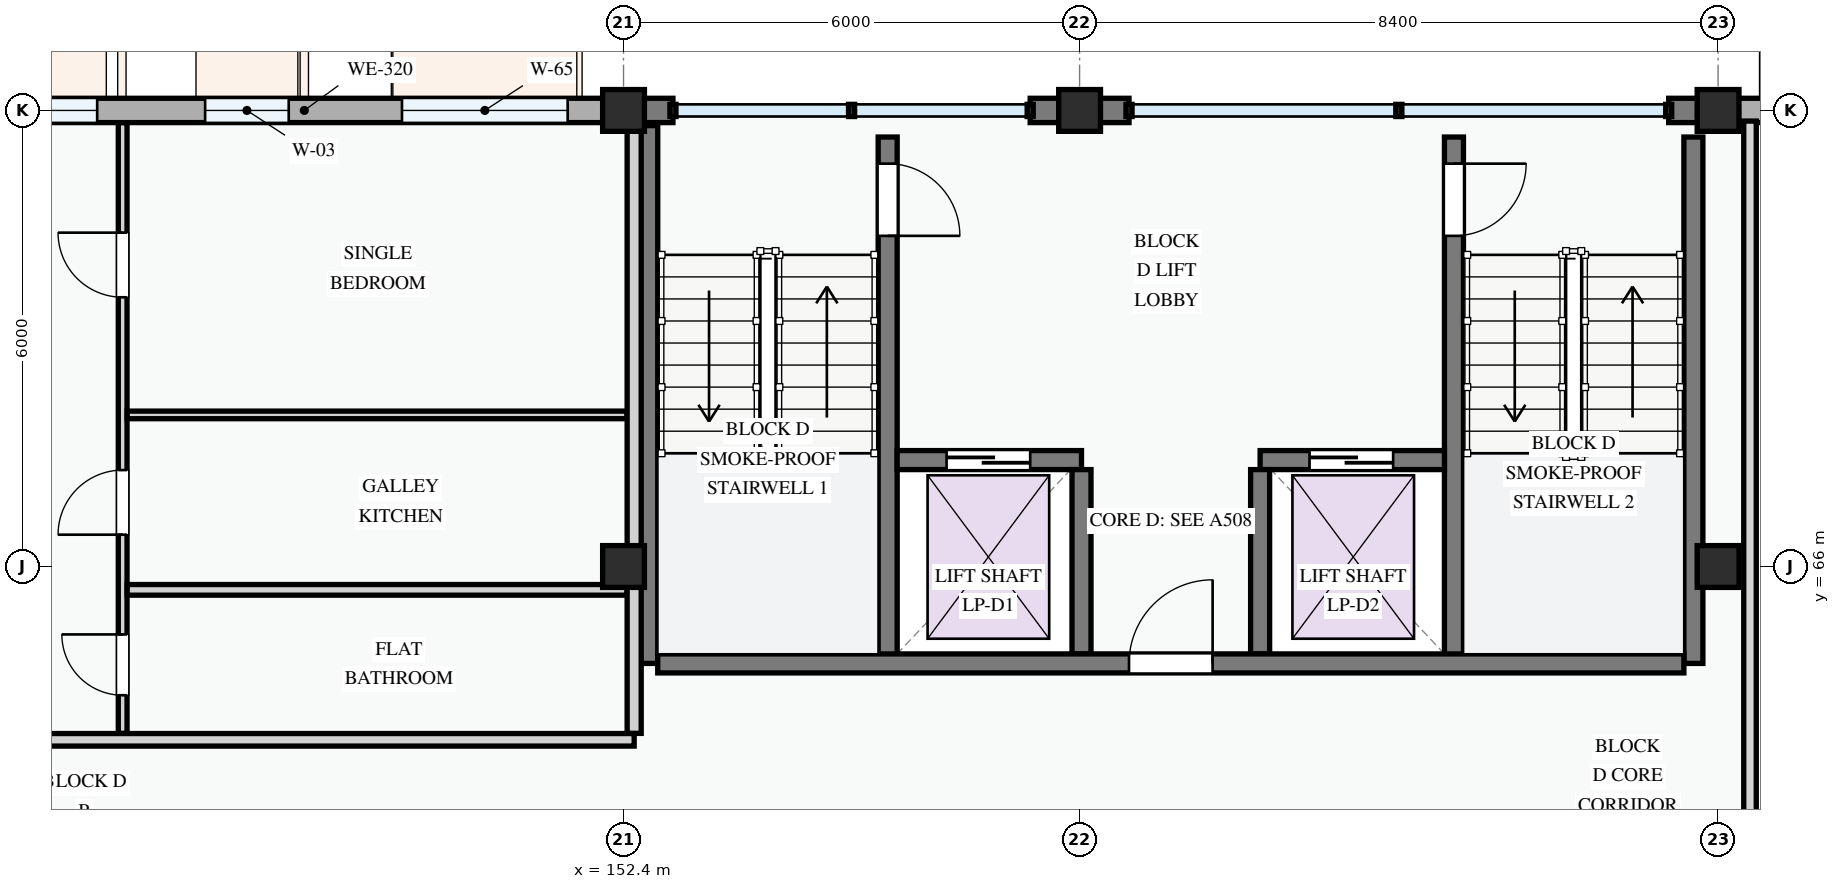
"""IFC4 building model, lengths in metres.
Left out: names, types, materials, properties, quantities, classifications, styles, units other than length and angle.
Written with IfcOpenShell. Run it as: python <this file> out.ifc"""

import sys

from ifc_helpers import new_model, si_unit, direction, frame, frame_2d, origin, origin_2d, place, context, subcontext, project, spatial, rectangle, extrude, element, fill, save


model = new_model("IFC4")
c1 = context("Model", 3, precision=1e-05, world=origin(), true_north=direction((0.0, 1.0)))
c2 = subcontext(c1, "Body", "Model", "MODEL_VIEW")
j1 = project(units=[si_unit("LENGTHUNIT", "METRE"), si_unit("PLANEANGLEUNIT", "RADIAN")], contexts=[c1])
p1 = place(None, origin())
s1 = spatial("IfcSite", under=j1, at=p1, CompositionType="ELEMENT")
p2 = place(p1, origin())
s2 = spatial("IfcBuilding", under=s1, at=p2, CompositionType="ELEMENT")
p3 = place(p2, frame((0.0, 0.0, 11.4)))
s3 = spatial("IfcBuildingStorey", under=s2, at=p3, CompositionType="ELEMENT", Elevation=11.4)
for number, where, z_axis, x_axis in (
    (1, (152.4, 66.0, 0.0), (0.0, 0.0, 1.0), (1.0, 0.0, 0.0)),
    (2, (152.4, 72.0, 0.0), (0.0, 0.0, 1.0), (1.0, 0.0, 0.0)),
    (3, (158.4, 72.0, 0.0), (0.0, 0.0, 1.0), (1.0, 0.0, 0.0)),
    (4, (166.8, 66.0, 0.0), (0.0, 0.0, 1.0), (1.0, 0.0, 0.0)),
    (5, (166.8, 72.0, 0.0), (0.0, 0.0, 1.0), (1.0, 0.0, 0.0)),
):
    element("IfcColumn", number, at=place(p3, frame(where, z_axis=z_axis, x_axis=x_axis)), inside=s3, PredefinedType="COLUMN", context=c2, shape_type="SweptSolid", body=[
        extrude(rectangle(XDim=0.55, YDim=0.55, at=origin_2d()), origin(), (0.0, 0.0, 1.0), 3.3),
    ])
p4 = place(p3, frame((152.4, 72.0, 0.0), z_axis=(0.0, 0.0, 1.0), x_axis=(-1.0, 0.0, 0.0)))
e6 = element("IfcWall", 6, at=p4, inside=s3, PredefinedType="STANDARD", context=c2, shape_type="SweptSolid", body=[
    extrude(rectangle(XDim=8.4, YDim=0.32, at=frame_2d((4.2, 0.0))), origin(), (0.0, 0.0, 1.0), 2.375),
])
p5 = place(p4, frame((0.735, 0.0, 0.78)))
e7 = element("IfcOpeningElement", 7, at=p5, cuts=e6, PredefinedType="OPENING", context=c2, shape_type="SweptSolid", body=[
    extrude(rectangle(XDim=2.18, YDim=1.48, at=frame_2d((1.09, 0.74))), frame((0.0, 0.17, 0.0), z_axis=(0.0, -1.0, 0.0), x_axis=(1.0, 0.0, 0.0)), (0.0, 0.0, 1.0), 0.34),
])
p6 = place(p4, frame((4.405, 0.0, 0.78)))
e8 = element("IfcOpeningElement", 8, at=p6, cuts=e6, PredefinedType="OPENING", context=c2, shape_type="SweptSolid", body=[
    extrude(rectangle(XDim=1.1, YDim=1.3, at=frame_2d((0.55, 0.65))), frame((0.0, 0.17, 0.0), z_axis=(0.0, -1.0, 0.0), x_axis=(1.0, 0.0, 0.0)), (0.0, 0.0, 1.0), 0.34),
])
p7 = place(p4, frame((6.925, 0.0, 0.78)))
e9 = element("IfcOpeningElement", 9, at=p7, cuts=e6, PredefinedType="OPENING", context=c2, shape_type="SweptSolid", body=[
    extrude(rectangle(XDim=0.95, YDim=1.15, at=frame_2d((0.475, 0.575))), frame((0.0, 0.17, 0.0), z_axis=(0.0, -1.0, 0.0), x_axis=(1.0, 0.0, 0.0)), (0.0, 0.0, 1.0), 0.34),
])
p8 = place(p3, frame((174.0, 72.0, 0.0), z_axis=(0.0, 0.0, 1.0), x_axis=(-1.0, 0.0, 0.0)))
e10 = element("IfcWall", 10, at=p8, inside=s3, PredefinedType="STANDARD", context=c2, shape_type="SweptSolid", body=[
    extrude(rectangle(XDim=7.2, YDim=0.32, at=frame_2d((3.6, 0.0))), origin(), (0.0, 0.0, 1.0), 2.375),
])
p9 = place(p8, frame((1.248, 0.0, 0.78)))
e11 = element("IfcOpeningElement", 11, at=p9, cuts=e10, PredefinedType="OPENING", context=c2, shape_type="SweptSolid", body=[
    extrude(rectangle(XDim=1.25, YDim=1.45, at=frame_2d((0.625, 0.725))), frame((0.0, 0.17, 0.0), z_axis=(0.0, -1.0, 0.0), x_axis=(1.0, 0.0, 0.0)), (0.0, 0.0, 1.0), 0.34),
])
p10 = place(p8, frame((4.258, 0.0, 0.78)))
e12 = element("IfcOpeningElement", 12, at=p10, cuts=e10, PredefinedType="OPENING", context=c2, shape_type="SweptSolid", body=[
    extrude(rectangle(XDim=1.68, YDim=1.46, at=frame_2d((0.84, 0.73))), frame((0.0, 0.17, 0.0), z_axis=(0.0, -1.0, 0.0), x_axis=(1.0, 0.0, 0.0)), (0.0, 0.0, 1.0), 0.34),
])
for number, where, z_axis, x_axis in (
    (13, (166.8, 72.0, 0.0), (0.0, 0.0, 1.0), (-1.0, 0.0, 0.0)),
    (14, (159.05, 72.0, 0.0), (0.0, 0.0, 1.0), (-1.0, 0.0, 0.0)),
):
    element("IfcWall", number, at=place(p3, frame(where, z_axis=z_axis, x_axis=x_axis)), inside=s3, PredefinedType="STANDARD", context=c2, shape_type="SweptSolid", body=[
        extrude(rectangle(XDim=0.65, YDim=0.32, at=frame_2d((0.325, 0.0))), origin(), (0.0, 0.0, 1.0), 3.04),
    ])
p11 = place(p3, frame((158.4, 72.0, 0.0), z_axis=(0.0, 0.0, 1.0), x_axis=(-1.0, 0.0, 0.0)))
e15 = element("IfcWall", 15, at=p11, inside=s3, PredefinedType="STANDARD", context=c2, shape_type="SweptSolid", body=[
    extrude(rectangle(XDim=0.65, YDim=0.32, at=frame_2d((0.325, 0.0))), origin(), (0.0, 0.0, 1.0), 3.04),
])
p12 = place(p3, frame((153.05, 72.0, 0.0), z_axis=(0.0, 0.0, 1.0), x_axis=(-1.0, 0.0, 0.0)))
e16 = element("IfcWall", 16, at=p12, inside=s3, PredefinedType="STANDARD", context=c2, shape_type="SweptSolid", body=[
    extrude(rectangle(XDim=0.65, YDim=0.32, at=frame_2d((0.325, 0.0))), origin(), (0.0, 0.0, 1.0), 3.04),
])
p13 = place(p3, frame((155.875, 71.65, 0.0), z_axis=(0.0, 0.0, 1.0), x_axis=(0.0, -1.0, 0.0)))
e17 = element("IfcWall", 17, at=p13, inside=s3, PredefinedType="SHEAR", context=c2, shape_type="SweptSolid", body=[
    extrude(rectangle(XDim=6.925, YDim=0.25, at=frame_2d((3.462, 0.0))), origin(), (0.0, 0.0, 1.0), 3.0),
])
p14 = place(p13, frame((0.35, 0.0, 0.0)))
e18 = element("IfcOpeningElement", 18, at=p14, cuts=e17, PredefinedType="OPENING", context=c2, shape_type="SweptSolid", body=[
    extrude(rectangle(XDim=0.95, YDim=2.1, at=frame_2d((0.475, 1.05))), frame((0.0, 0.135, 0.0), z_axis=(0.0, -1.0, 0.0), x_axis=(1.0, 0.0, 0.0)), (0.0, 0.0, 1.0), 0.27),
])
p15 = place(p3, frame((152.725, 71.8, 0.0), z_axis=(0.0, 0.0, 1.0), x_axis=(0.0, -1.0, 0.0)))
e19 = element("IfcWall", 19, at=p15, inside=s3, PredefinedType="SHEAR", context=c2, shape_type="SweptSolid", body=[
    extrude(rectangle(XDim=7.075, YDim=0.25, at=frame_2d((3.538, 0.0))), origin(), (0.0, 0.0, 1.0), 3.0),
])
p16 = place(p3, frame((166.475, 71.65, 0.0), z_axis=(0.0, 0.0, 1.0), x_axis=(0.0, -1.0, 0.0)))
e20 = element("IfcWall", 20, at=p16, inside=s3, PredefinedType="SHEAR", context=c2, shape_type="SweptSolid", body=[
    extrude(rectangle(XDim=6.925, YDim=0.25, at=frame_2d((3.462, 0.0))), origin(), (0.0, 0.0, 1.0), 3.0),
])
p17 = place(p3, frame((163.325, 71.65, 0.0), z_axis=(0.0, 0.0, 1.0), x_axis=(0.0, -1.0, 0.0)))
e21 = element("IfcWall", 21, at=p17, inside=s3, PredefinedType="SHEAR", context=c2, shape_type="SweptSolid", body=[
    extrude(rectangle(XDim=6.925, YDim=0.25, at=frame_2d((3.462, 0.0))), origin(), (0.0, 0.0, 1.0), 3.0),
])
p18 = place(p17, frame((0.35, 0.0, 0.0)))
e22 = element("IfcOpeningElement", 22, at=p18, cuts=e21, PredefinedType="OPENING", context=c2, shape_type="SweptSolid", body=[
    extrude(rectangle(XDim=0.95, YDim=2.1, at=frame_2d((0.475, 1.05))), frame((0.0, 0.135, 0.0), z_axis=(0.0, -1.0, 0.0), x_axis=(1.0, 0.0, 0.0)), (0.0, 0.0, 1.0), 0.27),
])
p19 = place(p3, frame((156.0, 67.4, 0.0), z_axis=(0.0, 0.0, 1.0), x_axis=(1.0, 0.0, 0.0)))
e23 = element("IfcWall", 23, at=p19, inside=s3, PredefinedType="SHEAR", context=c2, shape_type="SweptSolid", body=[
    extrude(rectangle(XDim=2.425, YDim=0.25, at=frame_2d((1.212, 0.0))), origin(), (0.0, 0.0, 1.0), 3.0),
])
p20 = place(p19, frame((0.65, 0.0, 0.0)))
e24 = element("IfcOpeningElement", 24, at=p20, cuts=e23, PredefinedType="OPENING", context=c2, shape_type="SweptSolid", body=[
    extrude(rectangle(XDim=1.1, YDim=2.15, at=frame_2d((0.55, 1.075))), frame((0.0, 0.135, 0.0), z_axis=(0.0, -1.0, 0.0), x_axis=(1.0, 0.0, 0.0)), (0.0, 0.0, 1.0), 0.27),
])
p21 = place(p3, frame((160.775, 67.4, 0.0), z_axis=(0.0, 0.0, 1.0), x_axis=(1.0, 0.0, 0.0)))
e25 = element("IfcWall", 25, at=p21, inside=s3, PredefinedType="SHEAR", context=c2, shape_type="SweptSolid", body=[
    extrude(rectangle(XDim=2.425, YDim=0.25, at=frame_2d((1.212, 0.0))), origin(), (0.0, 0.0, 1.0), 3.0),
])
p22 = place(p21, frame((0.65, 0.0, 0.0)))
e26 = element("IfcOpeningElement", 26, at=p22, cuts=e25, PredefinedType="OPENING", context=c2, shape_type="SweptSolid", body=[
    extrude(rectangle(XDim=1.1, YDim=2.15, at=frame_2d((0.55, 1.075))), frame((0.0, 0.135, 0.0), z_axis=(0.0, -1.0, 0.0), x_axis=(1.0, 0.0, 0.0)), (0.0, 0.0, 1.0), 0.27),
])
for number, where, z_axis, x_axis in (
    (27, (158.425, 67.275, 0.0), (0.0, 0.0, 1.0), (0.0, -1.0, 0.0)),
    (28, (160.775, 67.275, 0.0), (0.0, 0.0, 1.0), (0.0, -1.0, 0.0)),
):
    element("IfcWall", number, at=place(p3, frame(where, z_axis=z_axis, x_axis=x_axis)), inside=s3, PredefinedType="SHEAR", context=c2, shape_type="SweptSolid", body=[
        extrude(rectangle(XDim=2.425, YDim=0.25, at=frame_2d((1.212, 0.0))), origin(), (0.0, 0.0, 1.0), 3.0),
    ])
p23 = place(p3, frame((152.85, 64.725, 0.0), z_axis=(0.0, 0.0, 1.0), x_axis=(1.0, 0.0, 0.0)))
e29 = element("IfcWall", 29, at=p23, inside=s3, PredefinedType="SHEAR", context=c2, shape_type="SweptSolid", body=[
    extrude(rectangle(XDim=13.5, YDim=0.25, at=frame_2d((6.75, 0.0))), origin(), (0.0, 0.0, 1.0), 3.0),
])
p24 = place(p23, frame((6.2, 0.0, 0.0)))
e30 = element("IfcOpeningElement", 30, at=p24, cuts=e29, PredefinedType="OPENING", context=c2, shape_type="SweptSolid", body=[
    extrude(rectangle(XDim=1.1, YDim=2.15, at=frame_2d((0.55, 1.075))), frame((0.0, 0.135, 0.0), z_axis=(0.0, -1.0, 0.0), x_axis=(1.0, 0.0, 0.0)), (0.0, 0.0, 1.0), 0.27),
])
p25 = place(p3, frame((167.22, 57.842, 0.0), z_axis=(0.0, 0.0, 1.0), x_axis=(0.0, 1.0, 0.0)))
e31 = element("IfcWall", 31, at=p25, inside=s3, PredefinedType="PARTITIONING", context=c2, shape_type="SweptSolid", body=[
    extrude(rectangle(XDim=14.018, YDim=0.165, at=frame_2d((7.009, 0.0))), origin(), (0.0, 0.0, 1.0), 2.425),
])
p26 = place(p25, frame((2.448, 0.0, 0.0)))
e32 = element("IfcOpeningElement", 32, at=p26, cuts=e31, PredefinedType="OPENING", context=c2, shape_type="SweptSolid", body=[
    extrude(rectangle(XDim=0.92, YDim=2.1, at=frame_2d((0.46, 1.05))), frame((0.0, 0.093, 0.0), z_axis=(0.0, -1.0, 0.0), x_axis=(1.0, 0.0, 0.0)), (0.0, 0.0, 1.0), 0.185),
])
p27 = place(p3, frame((145.81, 63.804, 0.0), z_axis=(0.0, 0.0, 1.0), x_axis=(0.0, 1.0, 0.0)))
e33 = element("IfcWall", 33, at=p27, inside=s3, PredefinedType="PARTITIONING", context=c2, shape_type="SweptSolid", body=[
    extrude(rectangle(XDim=8.033, YDim=0.115, at=frame_2d((4.017, 0.0))), origin(), (0.0, 0.0, 1.0), 3.0),
])
p28 = place(p27, frame((0.502, 0.0, 0.0)))
e34 = element("IfcOpeningElement", 34, at=p28, cuts=e33, PredefinedType="OPENING", context=c2, shape_type="SweptSolid", body=[
    extrude(rectangle(XDim=0.8, YDim=2.1, at=frame_2d((0.4, 1.05))), frame((0.0, 0.067, 0.0), z_axis=(0.0, -1.0, 0.0), x_axis=(1.0, 0.0, 0.0)), (0.0, 0.0, 1.0), 0.135),
])
p29 = place(p27, frame((2.614, 0.0, 0.0)))
e35 = element("IfcOpeningElement", 35, at=p29, cuts=e33, PredefinedType="OPENING", context=c2, shape_type="SweptSolid", body=[
    extrude(rectangle(XDim=0.85, YDim=2.1, at=frame_2d((0.425, 1.05))), frame((0.0, 0.067, 0.0), z_axis=(0.0, -1.0, 0.0), x_axis=(1.0, 0.0, 0.0)), (0.0, 0.0, 1.0), 0.135),
])
p30 = place(p27, frame((5.738, 0.0, 0.0)))
e36 = element("IfcOpeningElement", 36, at=p30, cuts=e33, PredefinedType="OPENING", context=c2, shape_type="SweptSolid", body=[
    extrude(rectangle(XDim=0.85, YDim=2.1, at=frame_2d((0.425, 1.05))), frame((0.0, 0.067, 0.0), z_axis=(0.0, -1.0, 0.0), x_axis=(1.0, 0.0, 0.0)), (0.0, 0.0, 1.0), 0.135),
])
p31 = place(p3, frame((145.87, 67.994, 0.0), z_axis=(0.0, 0.0, 1.0), x_axis=(1.0, 0.0, 0.0)))
e37 = element("IfcWall", 37, at=p31, inside=s3, PredefinedType="PARTITIONING", context=c2, shape_type="SweptSolid", body=[
    extrude(rectangle(XDim=6.576, YDim=0.1, at=frame_2d((3.288, 0.0))), origin(), (0.0, 0.0, 1.0), 3.0),
])
p32 = place(p3, frame((145.87, 65.693, 0.0), z_axis=(0.0, 0.0, 1.0), x_axis=(1.0, 0.0, 0.0)))
e38 = element("IfcWall", 38, at=p32, inside=s3, PredefinedType="PARTITIONING", context=c2, shape_type="SweptSolid", body=[
    extrude(rectangle(XDim=6.576, YDim=0.14, at=frame_2d((3.288, 0.0))), origin(), (0.0, 0.0, 1.0), 2.375),
])
p33 = place(p3, frame((152.54, 63.804, 0.0), z_axis=(0.0, 0.0, 1.0), x_axis=(0.0, 1.0, 0.0)))
e39 = element("IfcWall", 39, at=p33, inside=s3, PredefinedType="PARTITIONING", context=c2, shape_type="SweptSolid", body=[
    extrude(rectangle(XDim=8.033, YDim=0.185, at=frame_2d((4.017, 0.0))), origin(), (0.0, 0.0, 1.0), 2.425),
])
p34 = place(p3, frame((138.06, 63.72, 0.0), z_axis=(0.0, 0.0, 1.0), x_axis=(1.0, 0.0, 0.0)))
e40 = element("IfcWall", 40, at=p34, inside=s3, PredefinedType="PARTITIONING", context=c2, shape_type="SweptSolid", body=[
    extrude(rectangle(XDim=14.48, YDim=0.165, at=frame_2d((7.24, 0.0))), origin(), (0.0, 0.0, 1.0), 3.0),
])
p35 = place(p34, frame((2.412, 0.0, 0.0)))
e41 = element("IfcOpeningElement", 41, at=p35, cuts=e40, PredefinedType="OPENING", context=c2, shape_type="SweptSolid", body=[
    extrude(rectangle(XDim=0.92, YDim=2.1, at=frame_2d((0.46, 1.05))), frame((0.0, 0.093, 0.0), z_axis=(0.0, -1.0, 0.0), x_axis=(1.0, 0.0, 0.0)), (0.0, 0.0, 1.0), 0.185),
])
p36 = place(p5, origin())
e42 = element("IfcWindow", 42, at=p36, inside=s3, PartitioningType="DOUBLE_PANEL_VERTICAL", PredefinedType="WINDOW", context=c2, shape_type="SweptSolid", body=[
    extrude(rectangle(XDim=2.18, YDim=1.48, at=frame_2d((1.09, 0.74))), frame((0.0, 0.03, 0.0), z_axis=(0.0, -1.0, 0.0), x_axis=(1.0, 0.0, 0.0)), (0.0, 0.0, 1.0), 0.06),
])
fill(e7, e42)
p37 = place(p6, origin())
e43 = element("IfcWindow", 43, at=p37, inside=s3, PartitioningType="SINGLE_PANEL", PredefinedType="WINDOW", context=c2, shape_type="SweptSolid", body=[
    extrude(rectangle(XDim=1.1, YDim=1.3, at=frame_2d((0.55, 0.65))), frame((0.0, 0.03, 0.0), z_axis=(0.0, -1.0, 0.0), x_axis=(1.0, 0.0, 0.0)), (0.0, 0.0, 1.0), 0.06),
])
fill(e8, e43)
p38 = place(p7, origin())
e44 = element("IfcWindow", 44, at=p38, inside=s3, PartitioningType="SINGLE_PANEL", PredefinedType="WINDOW", context=c2, shape_type="SweptSolid", body=[
    extrude(rectangle(XDim=0.95, YDim=1.15, at=frame_2d((0.475, 0.575))), frame((0.0, 0.03, 0.0), z_axis=(0.0, -1.0, 0.0), x_axis=(1.0, 0.0, 0.0)), (0.0, 0.0, 1.0), 0.06),
])
fill(e9, e44)
p39 = place(p14, origin())
e45 = element("IfcDoor", 45, at=p39, inside=s3, OperationType="SINGLE_SWING_RIGHT", PredefinedType="DOOR", context=c2, shape_type="SweptSolid", body=[
    extrude(rectangle(XDim=0.95, YDim=2.1, at=frame_2d((0.475, 1.05))), frame((0.0, 0.025, 0.0), z_axis=(0.0, -1.0, 0.0), x_axis=(1.0, 0.0, 0.0)), (0.0, 0.0, 1.0), 0.05),
])
fill(e18, e45)
p40 = place(p18, origin())
e46 = element("IfcDoor", 46, at=p40, inside=s3, OperationType="SINGLE_SWING_LEFT", PredefinedType="DOOR", context=c2, shape_type="SweptSolid", body=[
    extrude(rectangle(XDim=0.95, YDim=2.1, at=frame_2d((0.475, 1.05))), frame((0.0, 0.025, 0.0), z_axis=(0.0, -1.0, 0.0), x_axis=(1.0, 0.0, 0.0)), (0.0, 0.0, 1.0), 0.05),
])
fill(e22, e46)
p41 = place(p20, origin())
e47 = element("IfcDoor", 47, at=p41, inside=s3, OperationType="SLIDING_TO_LEFT", PredefinedType="DOOR", context=c2, shape_type="SweptSolid", body=[
    extrude(rectangle(XDim=1.1, YDim=2.15, at=frame_2d((0.55, 1.075))), frame((0.0, 0.025, 0.0), z_axis=(0.0, -1.0, 0.0), x_axis=(1.0, 0.0, 0.0)), (0.0, 0.0, 1.0), 0.05),
])
fill(e24, e47)
p42 = place(p22, origin())
e48 = element("IfcDoor", 48, at=p42, inside=s3, OperationType="SLIDING_TO_LEFT", PredefinedType="DOOR", context=c2, shape_type="SweptSolid", body=[
    extrude(rectangle(XDim=1.1, YDim=2.15, at=frame_2d((0.55, 1.075))), frame((0.0, 0.025, 0.0), z_axis=(0.0, -1.0, 0.0), x_axis=(1.0, 0.0, 0.0)), (0.0, 0.0, 1.0), 0.05),
])
fill(e26, e48)
p43 = place(p24, origin())
e49 = element("IfcDoor", 49, at=p43, inside=s3, OperationType="SINGLE_SWING_RIGHT", PredefinedType="DOOR", context=c2, shape_type="SweptSolid", body=[
    extrude(rectangle(XDim=1.1, YDim=2.15, at=frame_2d((0.55, 1.075))), frame((0.0, 0.025, 0.0), z_axis=(0.0, -1.0, 0.0), x_axis=(1.0, 0.0, 0.0)), (0.0, 0.0, 1.0), 0.05),
])
fill(e30, e49)
p44 = place(p28, origin())
e50 = element("IfcDoor", 50, at=p44, inside=s3, OperationType="SINGLE_SWING_RIGHT", PredefinedType="DOOR", context=c2, shape_type="SweptSolid", body=[
    extrude(rectangle(XDim=0.8, YDim=2.1, at=frame_2d((0.4, 1.05))), frame((0.0, 0.025, 0.0), z_axis=(0.0, -1.0, 0.0), x_axis=(1.0, 0.0, 0.0)), (0.0, 0.0, 1.0), 0.05),
])
fill(e34, e50)
p45 = place(p29, origin())
e51 = element("IfcDoor", 51, at=p45, inside=s3, OperationType="SINGLE_SWING_LEFT", PredefinedType="DOOR", context=c2, shape_type="SweptSolid", body=[
    extrude(rectangle(XDim=0.85, YDim=2.1, at=frame_2d((0.425, 1.05))), frame((0.0, 0.025, 0.0), z_axis=(0.0, -1.0, 0.0), x_axis=(1.0, 0.0, 0.0)), (0.0, 0.0, 1.0), 0.05),
])
fill(e35, e51)
p46 = place(p30, origin())
e52 = element("IfcDoor", 52, at=p46, inside=s3, OperationType="SINGLE_SWING_RIGHT", PredefinedType="DOOR", context=c2, shape_type="SweptSolid", body=[
    extrude(rectangle(XDim=0.85, YDim=2.1, at=frame_2d((0.425, 1.05))), frame((0.0, 0.025, 0.0), z_axis=(0.0, -1.0, 0.0), x_axis=(1.0, 0.0, 0.0)), (0.0, 0.0, 1.0), 0.05),
])
fill(e36, e52)
save(model, sys.argv[1])
